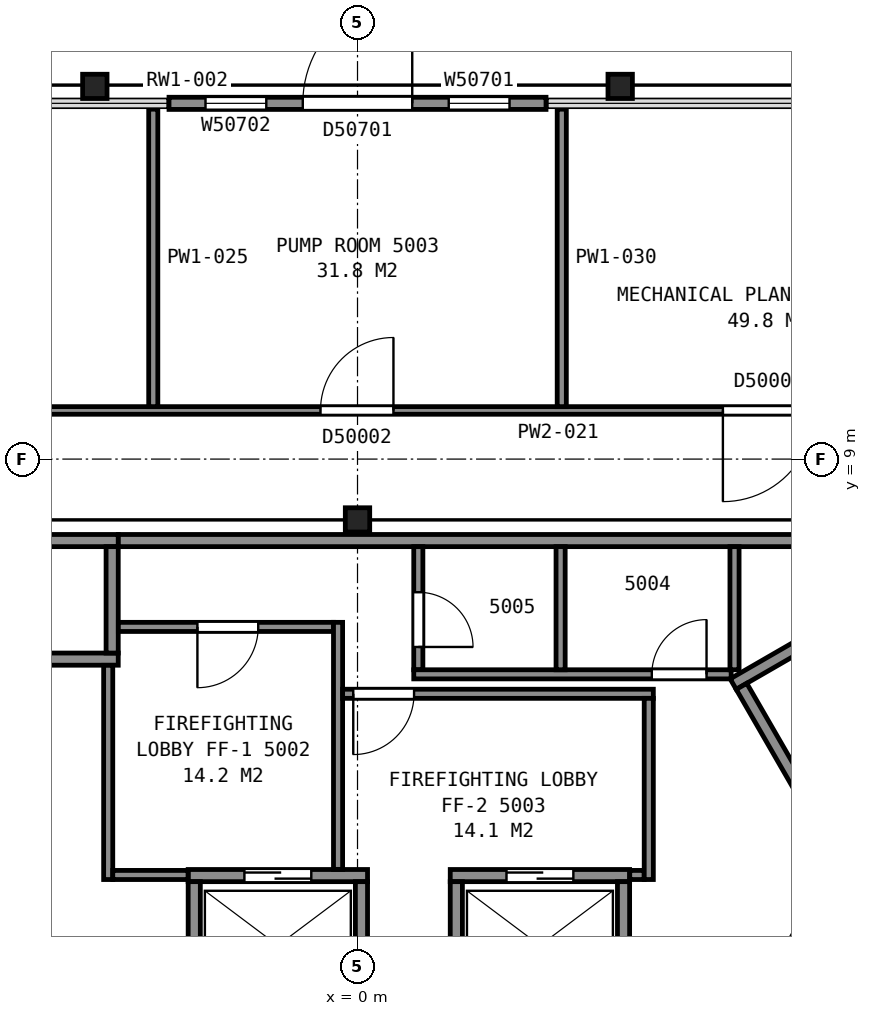
"""IFC4 building model, lengths in metres.
Left out: names, types, materials, properties, quantities, classifications, styles, units other than length and angle.
Written with IfcOpenShell. Run it as: python <this file> out.ifc"""

import sys

from ifc_helpers import new_model, si_unit, direction, frame, frame_2d, origin, origin_2d, place, context, subcontext, project, spatial, rectangle, i_section, extrude, element, fill, save


model = new_model("IFC4")
c1 = context("Model", 3, precision=1e-05, world=origin(), true_north=direction((0.0, 1.0)))
c2 = subcontext(c1, "Body", "Model", "MODEL_VIEW")
j1 = project(units=[si_unit("LENGTHUNIT", "METRE"), si_unit("PLANEANGLEUNIT", "RADIAN")], contexts=[c1])
p1 = place(None, origin())
s1 = spatial("IfcSite", under=j1, at=p1, CompositionType="ELEMENT")
p2 = place(p1, origin())
s2 = spatial("IfcBuilding", under=s1, at=p2, CompositionType="ELEMENT")
p3 = place(p2, frame((0.0, 0.0, 200.6)))
s3 = spatial("IfcBuildingStorey", under=s2, at=p3, CompositionType="ELEMENT", Elevation=200.6)
for number, where, z_axis, x_axis in (
    (1, (4.32, 15.13, -0.16), (0.0, 0.0, 1.0), (1.0, 0.0, 0.0)),
    (2, (-4.32, 15.13, -0.16), (0.0, 0.0, 1.0), (1.0, 0.0, 0.0)),
):
    element("IfcColumn", number, at=place(p3, frame(where, z_axis=z_axis, x_axis=x_axis)), inside=s3, PredefinedType="COLUMN", context=c2, shape_type="SweptSolid", body=[
        extrude(i_section(OverallWidth=0.401, OverallDepth=0.399, WebThickness=0.025, FlangeThickness=0.04, FilletRadius=0.015, at=origin_2d()), origin(), (0.0, 0.0, 1.0), 5.96),
    ])
p4 = place(p3, frame((0.0, 8.0, 0.0), z_axis=(0.0, 0.0, 1.0), x_axis=(1.0, 0.0, 0.0)))
e3 = element("IfcColumn", 3, at=p4, inside=s3, PredefinedType="COLUMN", context=c2, shape_type="SweptSolid", body=[
    extrude(i_section(OverallWidth=0.401, OverallDepth=0.399, WebThickness=0.025, FlangeThickness=0.04, FilletRadius=0.015, at=origin_2d()), origin(), (0.0, 0.0, 1.0), 5.8),
])
p5 = place(p3, frame((3.1, 14.851, 0.0), z_axis=(0.0, 0.0, 1.0), x_axis=(-1.0, 0.0, 0.0)))
e4 = element("IfcWall", 4, at=p5, inside=s3, PredefinedType="SOLIDWALL", context=c2, shape_type="SweptSolid", body=[
    extrude(rectangle(XDim=6.2, YDim=0.2, at=frame_2d((3.1, 0.0))), origin(), (0.0, 0.0, 1.0), 4.522),
])
p6 = place(p5, frame((0.6, 0.0, 0.9)))
e5 = element("IfcOpeningElement", 5, at=p6, cuts=e4, PredefinedType="OPENING", context=c2, shape_type="SweptSolid", body=[
    extrude(rectangle(XDim=1.0, YDim=1.5, at=frame_2d((0.5, 0.75))), frame((0.0, 0.11, 0.0), z_axis=(0.0, -1.0, 0.0), x_axis=(1.0, 0.0, 0.0)), (0.0, 0.0, 1.0), 0.22),
])
p7 = place(p5, frame((2.2, 0.0, 0.0)))
e6 = element("IfcOpeningElement", 6, at=p7, cuts=e4, PredefinedType="OPENING", context=c2, shape_type="SweptSolid", body=[
    extrude(rectangle(XDim=1.8, YDim=2.4, at=frame_2d((0.9, 1.2))), frame((0.0, 0.11, 0.0), z_axis=(0.0, -1.0, 0.0), x_axis=(1.0, 0.0, 0.0)), (0.0, 0.0, 1.0), 0.22),
])
p8 = place(p5, frame((4.6, 0.0, 0.9)))
e7 = element("IfcOpeningElement", 7, at=p8, cuts=e4, PredefinedType="OPENING", context=c2, shape_type="SweptSolid", body=[
    extrude(rectangle(XDim=1.0, YDim=1.5, at=frame_2d((0.5, 0.75))), frame((0.0, 0.11, 0.0), z_axis=(0.0, -1.0, 0.0), x_axis=(1.0, 0.0, 0.0)), (0.0, 0.0, 1.0), 0.22),
])
p9 = place(p3, frame((6.178, 5.299, 0.0), z_axis=(0.0, 0.0, 1.0), x_axis=(0.866019993635, 0.500009370536, 0.0)))
e8 = element("IfcWall", 8, at=p9, inside=s3, PredefinedType="PARTITIONING", context=c2, shape_type="SweptSolid", body=[
    extrude(rectangle(XDim=9.6, YDim=0.2, at=frame_2d((4.8, 0.0))), origin(), (0.0, 0.0, 1.0), 5.55),
])
p10 = place(p3, frame((7.715, 2.838, 0.0), z_axis=(0.0, 0.0, 1.0), x_axis=(-0.500049511043, 0.865996816683, 0.0)))
e9 = element("IfcWall", 9, at=p10, inside=s3, PredefinedType="PARTITIONING", context=c2, shape_type="SweptSolid", body=[
    extrude(rectangle(XDim=2.8, YDim=0.2, at=frame_2d((1.4, 0.0))), origin(), (0.0, 0.0, 1.0), 5.55),
])
p11 = place(p3, frame((-2.785, 2.15, 0.0), z_axis=(0.0, 0.0, 1.0), x_axis=(1.0, 0.0, 0.0)))
e10 = element("IfcWall", 10, at=p11, inside=s3, PredefinedType="PARTITIONING", context=c2, shape_type="SweptSolid", body=[
    extrude(rectangle(XDim=2.95, YDim=0.2, at=frame_2d((1.475, 0.0))), origin(), (0.0, 0.0, 1.0), 5.8),
])
p12 = place(p11, frame((0.925, 0.0, 0.0)))
e11 = element("IfcOpeningElement", 11, at=p12, cuts=e10, PredefinedType="OPENING", context=c2, shape_type="SweptSolid", body=[
    extrude(rectangle(XDim=1.1, YDim=2.1, at=frame_2d((0.55, 1.05))), frame((0.0, 0.11, 0.0), z_axis=(0.0, -1.0, 0.0), x_axis=(1.0, 0.0, 0.0)), (0.0, 0.0, 1.0), 0.22),
])
p13 = place(p3, frame((1.525, 2.15, 0.0), z_axis=(0.0, 0.0, 1.0), x_axis=(1.0, 0.0, 0.0)))
e12 = element("IfcWall", 12, at=p13, inside=s3, PredefinedType="PARTITIONING", context=c2, shape_type="SweptSolid", body=[
    extrude(rectangle(XDim=2.95, YDim=0.2, at=frame_2d((1.475, 0.0))), origin(), (0.0, 0.0, 1.0), 5.8),
])
p14 = place(p13, frame((0.925, 0.0, 0.0)))
e13 = element("IfcOpeningElement", 13, at=p14, cuts=e12, PredefinedType="OPENING", context=c2, shape_type="SweptSolid", body=[
    extrude(rectangle(XDim=1.1, YDim=2.1, at=frame_2d((0.55, 1.05))), frame((0.0, 0.11, 0.0), z_axis=(0.0, -1.0, 0.0), x_axis=(1.0, 0.0, 0.0)), (0.0, 0.0, 1.0), 0.22),
])
for number, where, z_axis, x_axis in (
    (14, (-6.285, 5.71, 0.0), (0.0, 0.0, 1.0), (1.0, 0.0, 0.0)),
    (15, (-6.285, 7.66, 0.0), (0.0, 0.0, 1.0), (1.0, 0.0, 0.0)),
):
    element("IfcWall", number, at=place(p3, frame(where, z_axis=z_axis, x_axis=x_axis)), inside=s3, PredefinedType="PARTITIONING", context=c2, shape_type="SweptSolid", body=[
        extrude(rectangle(XDim=2.35, YDim=0.2, at=frame_2d((1.175, 0.0))), origin(), (0.0, 0.0, 1.0), 5.8),
    ])
p15 = place(p3, frame((5.663, -1.612, 0.0), z_axis=(0.0, 0.0, 1.0), x_axis=(0.49998122708, 0.866036242063, 0.0)))
e16 = element("IfcWall", 16, at=p15, inside=s3, PredefinedType="PARTITIONING", context=c2, shape_type="SweptSolid", body=[
    extrude(rectangle(XDim=4.9, YDim=0.2, at=frame_2d((2.45, 0.0))), origin(), (0.0, 0.0, 1.0), 5.8),
])
for number, where, z_axis, x_axis in (
    (17, (4.375, 0.1, 0.0), (0.0, 0.0, 1.0), (0.0, 1.0, 0.0)),
    (18, (1.625, 0.1, 0.0), (0.0, 0.0, 1.0), (0.0, 1.0, 0.0)),
    (19, (0.065, 0.1, 0.0), (0.0, 0.0, 1.0), (0.0, 1.0, 0.0)),
    (20, (-2.685, 0.1, 0.0), (0.0, 0.0, 1.0), (0.0, 1.0, 0.0)),
):
    element("IfcWall", number, at=place(p3, frame(where, z_axis=z_axis, x_axis=x_axis)), inside=s3, PredefinedType="PARTITIONING", context=c2, shape_type="SweptSolid", body=[
        extrude(rectangle(XDim=1.95, YDim=0.2, at=frame_2d((0.975, 0.0))), origin(), (0.0, 0.0, 1.0), 5.8),
    ])
p16 = place(p3, frame((-4.035, 5.81, 0.0), z_axis=(0.0, 0.0, 1.0), x_axis=(0.0, 1.0, 0.0)))
e21 = element("IfcWall", 21, at=p16, inside=s3, PredefinedType="PARTITIONING", context=c2, shape_type="SweptSolid", body=[
    extrude(rectangle(XDim=1.75, YDim=0.2, at=frame_2d((0.875, 0.0))), origin(), (0.0, 0.0, 1.0), 5.8),
])
p17 = place(p3, frame((-4.1, 2.085, 0.0), z_axis=(0.0, 0.0, 1.0), x_axis=(0.0, 1.0, 0.0)))
e22 = element("IfcWall", 22, at=p17, inside=s3, PredefinedType="PARTITIONING", context=c2, shape_type="SweptSolid", body=[
    extrude(rectangle(XDim=3.523, YDim=0.15, at=frame_2d((1.761, 0.0))), origin(), (0.0, 0.0, 1.0), 5.55),
])
p18 = place(p3, frame((-4.025, 2.16, 0.0), z_axis=(0.0, 0.0, 1.0), x_axis=(1.0, 0.0, 0.0)))
e23 = element("IfcWall", 23, at=p18, inside=s3, PredefinedType="PARTITIONING", context=c2, shape_type="SweptSolid", body=[
    extrude(rectangle(XDim=1.238, YDim=0.15, at=frame_2d((0.619, 0.0))), origin(), (0.0, 0.0, 1.0), 5.55),
])
p19 = place(p3, frame((-3.933, 6.24, 0.0), z_axis=(0.0, 0.0, 1.0), x_axis=(1.0, 0.0, 0.0)))
e24 = element("IfcWall", 24, at=p19, inside=s3, PredefinedType="PARTITIONING", context=c2, shape_type="SweptSolid", body=[
    extrude(rectangle(XDim=3.538, YDim=0.15, at=frame_2d((1.769, 0.0))), origin(), (0.0, 0.0, 1.0), 5.55),
])
p20 = place(p19, frame((1.3, 0.0, 0.0)))
e25 = element("IfcOpeningElement", 25, at=p20, cuts=e24, PredefinedType="OPENING", context=c2, shape_type="SweptSolid", body=[
    extrude(rectangle(XDim=1.0, YDim=2.1, at=frame_2d((0.5, 1.05))), frame((0.0, 0.085, 0.0), z_axis=(0.0, -1.0, 0.0), x_axis=(1.0, 0.0, 0.0)), (0.0, 0.0, 1.0), 0.17),
])
p21 = place(p3, frame((-3.933, 7.66, 0.0), z_axis=(0.0, 0.0, 1.0), x_axis=(1.0, 0.0, 0.0)))
e26 = element("IfcWall", 26, at=p21, inside=s3, PredefinedType="PARTITIONING", context=c2, shape_type="SweptSolid", body=[
    extrude(rectangle(XDim=13.841, YDim=0.2, at=frame_2d((6.92, 0.0))), origin(), (0.0, 0.0, 1.0), 5.55),
])
p22 = place(p3, frame((-0.32, 2.252, 0.0), z_axis=(0.0, 0.0, 1.0), x_axis=(0.0, 1.0, 0.0)))
e27 = element("IfcWall", 27, at=p22, inside=s3, PredefinedType="PARTITIONING", context=c2, shape_type="SweptSolid", body=[
    extrude(rectangle(XDim=4.063, YDim=0.15, at=frame_2d((2.031, 0.0))), origin(), (0.0, 0.0, 1.0), 5.55),
])
p23 = place(p3, frame((-0.245, 5.14, 0.0), z_axis=(0.0, 0.0, 1.0), x_axis=(1.0, 0.0, 0.0)))
e28 = element("IfcWall", 28, at=p23, inside=s3, PredefinedType="PARTITIONING", context=c2, shape_type="SweptSolid", body=[
    extrude(rectangle(XDim=5.11, YDim=0.15, at=frame_2d((2.555, 0.0))), origin(), (0.0, 0.0, 1.0), 5.55),
])
p24 = place(p23, frame((0.175, 0.0, 0.0)))
e29 = element("IfcOpeningElement", 29, at=p24, cuts=e28, PredefinedType="OPENING", context=c2, shape_type="SweptSolid", body=[
    extrude(rectangle(XDim=1.0, YDim=2.1, at=frame_2d((0.5, 1.05))), frame((0.0, 0.085, 0.0), z_axis=(0.0, -1.0, 0.0), x_axis=(1.0, 0.0, 0.0)), (0.0, 0.0, 1.0), 0.17),
])
p25 = place(p3, frame((1.0, 7.56, 0.0), z_axis=(0.0, 0.0, 1.0), x_axis=(0.0, -1.0, 0.0)))
e30 = element("IfcWall", 30, at=p25, inside=s3, PredefinedType="PARTITIONING", context=c2, shape_type="SweptSolid", body=[
    extrude(rectangle(XDim=2.025, YDim=0.15, at=frame_2d((1.013, 0.0))), origin(), (0.0, 0.0, 1.0), 5.55),
])
p26 = place(p25, frame((0.75, 0.0, 0.0)))
e31 = element("IfcOpeningElement", 31, at=p26, cuts=e30, PredefinedType="OPENING", context=c2, shape_type="SweptSolid", body=[
    extrude(rectangle(XDim=0.9, YDim=2.1, at=frame_2d((0.45, 1.05))), frame((0.0, 0.085, 0.0), z_axis=(0.0, -1.0, 0.0), x_axis=(1.0, 0.0, 0.0)), (0.0, 0.0, 1.0), 0.17),
])
p27 = place(p3, frame((0.925, 5.46, 0.0), z_axis=(0.0, 0.0, 1.0), x_axis=(1.0, 0.0, 0.0)))
e32 = element("IfcWall", 32, at=p27, inside=s3, PredefinedType="PARTITIONING", context=c2, shape_type="SweptSolid", body=[
    extrude(rectangle(XDim=5.22, YDim=0.15, at=frame_2d((2.61, 0.0))), origin(), (0.0, 0.0, 1.0), 5.55),
])
p28 = place(p27, frame((3.915, 0.0, 0.0)))
e33 = element("IfcOpeningElement", 33, at=p28, cuts=e32, PredefinedType="OPENING", context=c2, shape_type="SweptSolid", body=[
    extrude(rectangle(XDim=0.9, YDim=2.1, at=frame_2d((0.45, 1.05))), frame((0.0, 0.085, 0.0), z_axis=(0.0, -1.0, 0.0), x_axis=(1.0, 0.0, 0.0)), (0.0, 0.0, 1.0), 0.17),
])
p29 = place(p3, frame((3.34, 5.535, 0.0), z_axis=(0.0, 0.0, 1.0), x_axis=(0.0, 1.0, 0.0)))
e34 = element("IfcWall", 34, at=p29, inside=s3, PredefinedType="PARTITIONING", context=c2, shape_type="SweptSolid", body=[
    extrude(rectangle(XDim=2.025, YDim=0.15, at=frame_2d((1.013, 0.0))), origin(), (0.0, 0.0, 1.0), 5.55),
])
p30 = place(p3, frame((4.477, 2.16, 0.0), z_axis=(0.0, 0.0, 1.0), x_axis=(1.0, 0.0, 0.0)))
e35 = element("IfcWall", 35, at=p30, inside=s3, PredefinedType="PARTITIONING", context=c2, shape_type="SweptSolid", body=[
    extrude(rectangle(XDim=0.238, YDim=0.15, at=frame_2d((0.119, 0.0))), origin(), (0.0, 0.0, 1.0), 5.55),
])
p31 = place(p3, frame((4.79, 2.085, 0.0), z_axis=(0.0, 0.0, 1.0), x_axis=(0.0, 1.0, 0.0)))
e36 = element("IfcWall", 36, at=p31, inside=s3, PredefinedType="PARTITIONING", context=c2, shape_type="SweptSolid", body=[
    extrude(rectangle(XDim=2.98, YDim=0.15, at=frame_2d((1.49, 0.0))), origin(), (0.0, 0.0, 1.0), 5.55),
])
p32 = place(p3, frame((6.2, 5.535, 0.0), z_axis=(0.0, 0.0, 1.0), x_axis=(0.0, 1.0, 0.0)))
e37 = element("IfcWall", 37, at=p32, inside=s3, PredefinedType="PARTITIONING", context=c2, shape_type="SweptSolid", body=[
    extrude(rectangle(XDim=2.025, YDim=0.15, at=frame_2d((1.013, 0.0))), origin(), (0.0, 0.0, 1.0), 5.55),
])
p33 = place(p3, frame((-3.901, -12.844, 0.0), z_axis=(0.0, 0.0, 1.0), x_axis=(-0.499989213553, 0.866031631253, 0.0)))
e38 = element("IfcWall", 38, at=p33, inside=s3, PredefinedType="PARTITIONING", context=c2, shape_type="SweptSolid", body=[
    extrude(rectangle(XDim=19.41, YDim=0.125, at=frame_2d((9.705, 0.0))), origin(), (0.0, 0.0, 1.0), 4.462),
])
p34 = place(p33, frame((13.497, 0.0, 0.0)))
e39 = element("IfcOpeningElement", 39, at=p34, cuts=e38, PredefinedType="OPENING", context=c2, shape_type="SweptSolid", body=[
    extrude(rectangle(XDim=1.5, YDim=2.1, at=frame_2d((0.75, 1.05))), frame((0.0, 0.073, 0.0), z_axis=(0.0, -1.0, 0.0), x_axis=(1.0, 0.0, 0.0)), (0.0, 0.0, 1.0), 0.145),
])
p35 = place(p33, frame((3.873, 0.0, 0.0)))
e40 = element("IfcOpeningElement", 40, at=p35, cuts=e38, PredefinedType="OPENING", context=c2, shape_type="SweptSolid", body=[
    extrude(rectangle(XDim=1.5, YDim=2.1, at=frame_2d((0.75, 1.05))), frame((0.0, 0.073, 0.0), z_axis=(0.0, -1.0, 0.0), x_axis=(1.0, 0.0, 0.0)), (0.0, 0.0, 1.0), 0.145),
])
p36 = place(p3, frame((-10.237, 9.8, 0.0), z_axis=(0.0, 0.0, 1.0), x_axis=(1.0, 0.0, 0.0)))
e41 = element("IfcWall", 41, at=p36, inside=s3, PredefinedType="PARTITIONING", context=c2, shape_type="SweptSolid", body=[
    extrude(rectangle(XDim=20.473, YDim=0.125, at=frame_2d((10.237, 0.0))), origin(), (0.0, 0.0, 1.0), 4.462),
])
p37 = place(p36, frame((16.246, 0.0, 0.0)))
e42 = element("IfcOpeningElement", 42, at=p37, cuts=e41, PredefinedType="OPENING", context=c2, shape_type="SweptSolid", body=[
    extrude(rectangle(XDim=1.5, YDim=2.1, at=frame_2d((0.75, 1.05))), frame((0.0, 0.073, 0.0), z_axis=(0.0, -1.0, 0.0), x_axis=(1.0, 0.0, 0.0)), (0.0, 0.0, 1.0), 0.145),
])
p38 = place(p36, frame((9.627, 0.0, 0.0)))
e43 = element("IfcOpeningElement", 43, at=p38, cuts=e41, PredefinedType="OPENING", context=c2, shape_type="SweptSolid", body=[
    extrude(rectangle(XDim=1.2, YDim=2.1, at=frame_2d((0.6, 1.05))), frame((0.0, 0.073, 0.0), z_axis=(0.0, -1.0, 0.0), x_axis=(1.0, 0.0, 0.0)), (0.0, 0.0, 1.0), 0.145),
])
p39 = place(p36, frame((2.712, 0.0, 0.0)))
e44 = element("IfcOpeningElement", 44, at=p39, cuts=e41, PredefinedType="OPENING", context=c2, shape_type="SweptSolid", body=[
    extrude(rectangle(XDim=1.5, YDim=2.1, at=frame_2d((0.75, 1.05))), frame((0.0, 0.073, 0.0), z_axis=(0.0, -1.0, 0.0), x_axis=(1.0, 0.0, 0.0)), (0.0, 0.0, 1.0), 0.145),
])
for number, where, z_axis, x_axis in (
    (45, (-3.359, 9.863, 0.0), (0.0, 0.0, 1.0), (0.0, 1.0, 0.0)),
    (46, (3.359, 9.863, 0.0), (0.0, 0.0, 1.0), (0.0, 1.0, 0.0)),
):
    element("IfcWall", number, at=place(p3, frame(where, z_axis=z_axis, x_axis=x_axis)), inside=s3, PredefinedType="PARTITIONING", context=c2, shape_type="SweptSolid", body=[
        extrude(rectangle(XDim=4.892, YDim=0.15, at=frame_2d((2.446, 0.0))), origin(), (0.0, 0.0, 1.0), 4.462),
    ])
p40 = place(p3, frame((13.605, 3.965, 0.0), z_axis=(0.0, 0.0, 1.0), x_axis=(-0.499989213553, -0.866031631253, 0.0)))
e47 = element("IfcWall", 47, at=p40, inside=s3, PredefinedType="PARTITIONING", context=c2, shape_type="SweptSolid", body=[
    extrude(rectangle(XDim=19.41, YDim=0.125, at=frame_2d((9.705, 0.0))), origin(), (0.0, 0.0, 1.0), 4.462),
])
p41 = place(p40, frame((1.899, 0.0, 0.0)))
e48 = element("IfcOpeningElement", 48, at=p41, cuts=e47, PredefinedType="OPENING", context=c2, shape_type="SweptSolid", body=[
    extrude(rectangle(XDim=1.5, YDim=2.1, at=frame_2d((0.75, 1.05))), frame((0.0, 0.073, 0.0), z_axis=(0.0, -1.0, 0.0), x_axis=(1.0, 0.0, 0.0)), (0.0, 0.0, 1.0), 0.145),
])
p42 = place(p6, origin())
e49 = element("IfcWindow", 49, at=p42, inside=s3, PartitioningType="SINGLE_PANEL", PredefinedType="WINDOW", context=c2, shape_type="SweptSolid", body=[
    extrude(rectangle(XDim=1.0, YDim=1.5, at=frame_2d((0.5, 0.75))), frame((0.0, 0.03, 0.0), z_axis=(0.0, -1.0, 0.0), x_axis=(1.0, 0.0, 0.0)), (0.0, 0.0, 1.0), 0.06),
])
fill(e5, e49)
p43 = place(p7, frame((1.8, 0.0, 0.0), z_axis=(0.0, 0.0, 1.0), x_axis=(-1.0, 0.0, 0.0)))
e50 = element("IfcDoor", 50, at=p43, inside=s3, OperationType="DOUBLE_DOOR_SINGLE_SWING", PredefinedType="DOOR", context=c2, shape_type="SweptSolid", body=[
    extrude(rectangle(XDim=1.8, YDim=2.4, at=frame_2d((0.9, 1.2))), frame((0.0, 0.025, 0.0), z_axis=(0.0, -1.0, 0.0), x_axis=(1.0, 0.0, 0.0)), (0.0, 0.0, 1.0), 0.05),
])
fill(e6, e50)
p44 = place(p8, origin())
e51 = element("IfcWindow", 51, at=p44, inside=s3, PartitioningType="SINGLE_PANEL", PredefinedType="WINDOW", context=c2, shape_type="SweptSolid", body=[
    extrude(rectangle(XDim=1.0, YDim=1.5, at=frame_2d((0.5, 0.75))), frame((0.0, 0.03, 0.0), z_axis=(0.0, -1.0, 0.0), x_axis=(1.0, 0.0, 0.0)), (0.0, 0.0, 1.0), 0.06),
])
fill(e7, e51)
p45 = place(p12, origin())
e52 = element("IfcDoor", 52, at=p45, inside=s3, OperationType="SLIDING_TO_LEFT", PredefinedType="DOOR", context=c2, shape_type="SweptSolid", body=[
    extrude(rectangle(XDim=1.1, YDim=2.1, at=frame_2d((0.55, 1.05))), frame((0.0, 0.025, 0.0), z_axis=(0.0, -1.0, 0.0), x_axis=(1.0, 0.0, 0.0)), (0.0, 0.0, 1.0), 0.05),
])
fill(e11, e52)
p46 = place(p14, origin())
e53 = element("IfcDoor", 53, at=p46, inside=s3, OperationType="SLIDING_TO_RIGHT", PredefinedType="DOOR", context=c2, shape_type="SweptSolid", body=[
    extrude(rectangle(XDim=1.1, YDim=2.1, at=frame_2d((0.55, 1.05))), frame((0.0, 0.025, 0.0), z_axis=(0.0, -1.0, 0.0), x_axis=(1.0, 0.0, 0.0)), (0.0, 0.0, 1.0), 0.05),
])
fill(e13, e53)
p47 = place(p20, origin())
e54 = element("IfcDoor", 54, at=p47, inside=s3, OperationType="SINGLE_SWING_LEFT", PredefinedType="DOOR", context=c2, shape_type="SweptSolid", body=[
    extrude(rectangle(XDim=1.0, YDim=2.1, at=frame_2d((0.5, 1.05))), frame((0.0, 0.025, 0.0), z_axis=(0.0, -1.0, 0.0), x_axis=(1.0, 0.0, 0.0)), (0.0, 0.0, 1.0), 0.05),
])
fill(e25, e54)
p48 = place(p24, origin())
e55 = element("IfcDoor", 55, at=p48, inside=s3, OperationType="SINGLE_SWING_LEFT", PredefinedType="DOOR", context=c2, shape_type="SweptSolid", body=[
    extrude(rectangle(XDim=1.0, YDim=2.1, at=frame_2d((0.5, 1.05))), frame((0.0, 0.025, 0.0), z_axis=(0.0, -1.0, 0.0), x_axis=(1.0, 0.0, 0.0)), (0.0, 0.0, 1.0), 0.05),
])
fill(e29, e55)
p49 = place(p26, origin())
e56 = element("IfcDoor", 56, at=p49, inside=s3, OperationType="SINGLE_SWING_RIGHT", PredefinedType="DOOR", context=c2, shape_type="SweptSolid", body=[
    extrude(rectangle(XDim=0.9, YDim=2.1, at=frame_2d((0.45, 1.05))), frame((0.0, 0.025, 0.0), z_axis=(0.0, -1.0, 0.0), x_axis=(1.0, 0.0, 0.0)), (0.0, 0.0, 1.0), 0.05),
])
fill(e31, e56)
p50 = place(p28, origin())
e57 = element("IfcDoor", 57, at=p50, inside=s3, OperationType="SINGLE_SWING_RIGHT", PredefinedType="DOOR", context=c2, shape_type="SweptSolid", body=[
    extrude(rectangle(XDim=0.9, YDim=2.1, at=frame_2d((0.45, 1.05))), frame((0.0, 0.025, 0.0), z_axis=(0.0, -1.0, 0.0), x_axis=(1.0, 0.0, 0.0)), (0.0, 0.0, 1.0), 0.05),
])
fill(e33, e57)
p51 = place(p37, origin())
e58 = element("IfcDoor", 58, at=p51, inside=s3, OperationType="DOUBLE_DOOR_SINGLE_SWING", PredefinedType="DOOR", context=c2, shape_type="SweptSolid", body=[
    extrude(rectangle(XDim=1.5, YDim=2.1, at=frame_2d((0.75, 1.05))), frame((0.0, 0.025, 0.0), z_axis=(0.0, -1.0, 0.0), x_axis=(1.0, 0.0, 0.0)), (0.0, 0.0, 1.0), 0.05),
])
fill(e42, e58)
p52 = place(p38, origin())
e59 = element("IfcDoor", 59, at=p52, inside=s3, OperationType="SINGLE_SWING_RIGHT", PredefinedType="DOOR", context=c2, shape_type="SweptSolid", body=[
    extrude(rectangle(XDim=1.2, YDim=2.1, at=frame_2d((0.6, 1.05))), frame((0.0, 0.025, 0.0), z_axis=(0.0, -1.0, 0.0), x_axis=(1.0, 0.0, 0.0)), (0.0, 0.0, 1.0), 0.05),
])
fill(e43, e59)
save(model, sys.argv[1])
